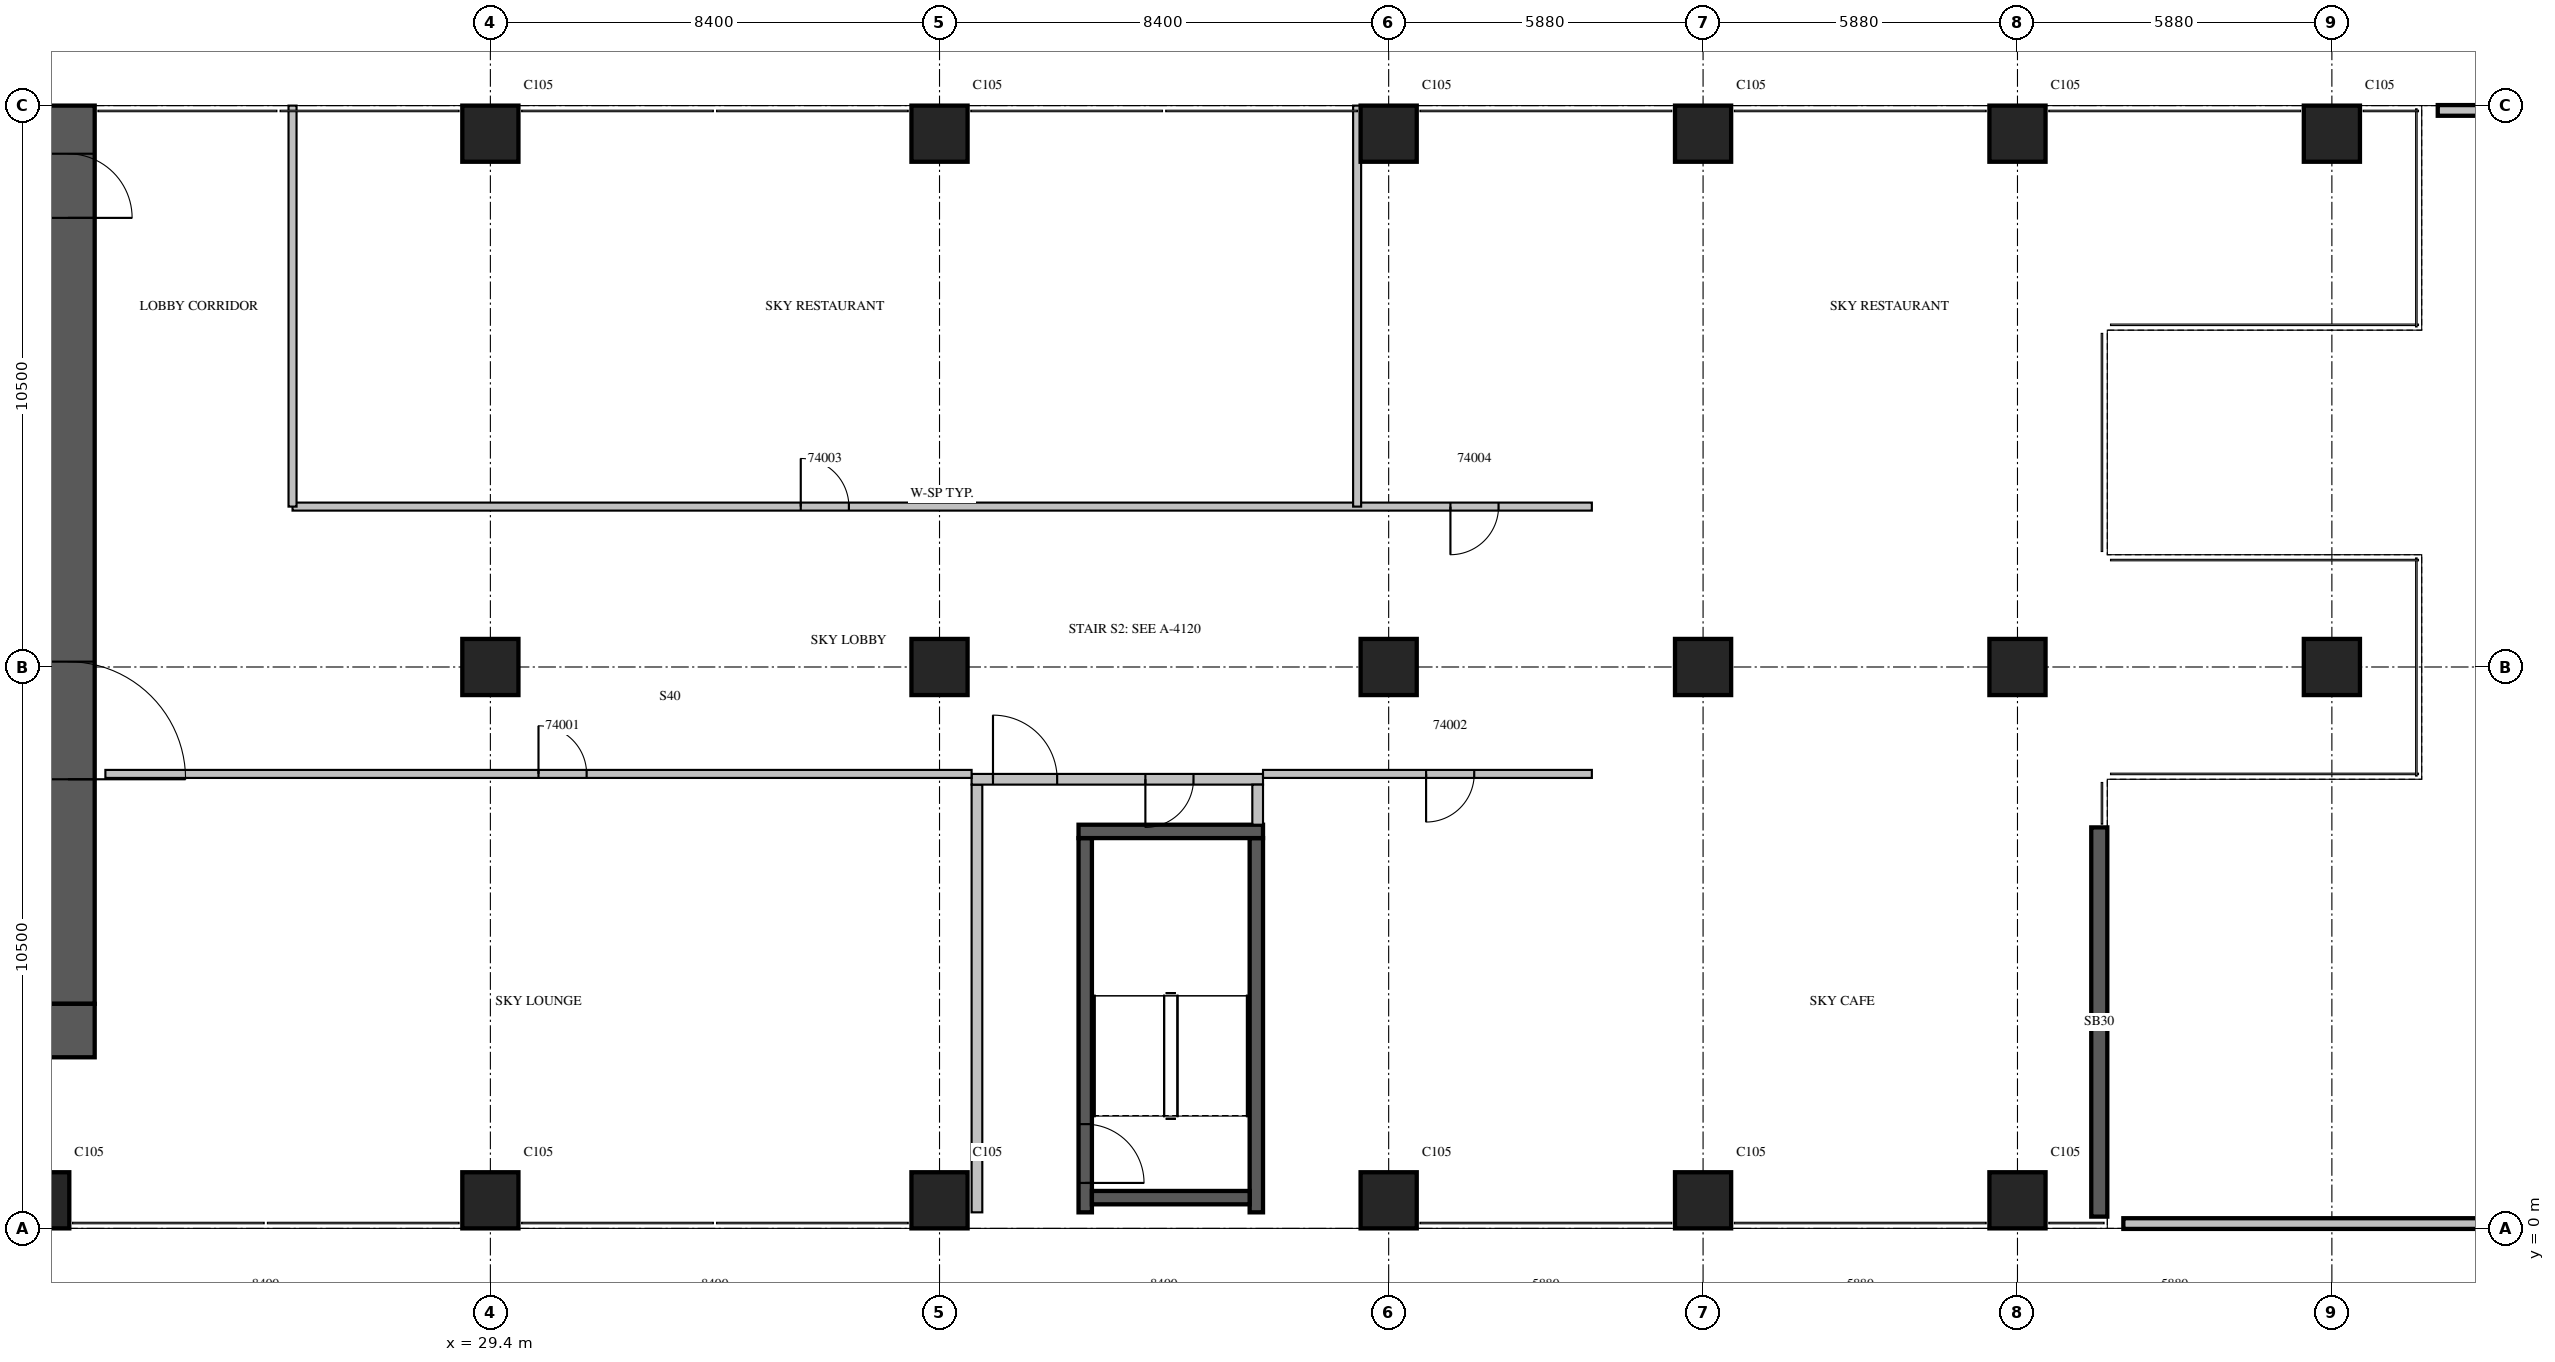
"""IFC4 building model, lengths in metres.
Left out: names, types, materials, properties, quantities, classifications, styles, units other than length and angle.
Written with IfcOpenShell. Run it as: python <this file> out.ifc"""

import sys

from ifc_helpers import new_model, si_unit, direction, frame, frame_2d, origin, origin_2d, place, context, subcontext, project, spatial, rectangle, extrude, source, transform, mapped, element, fill, save


model = new_model("IFC4")
c1 = context("Model", 3, precision=1e-05, world=origin(), true_north=direction((0.0, 1.0)))
c2 = subcontext(c1, "Body", "Model", "MODEL_VIEW")
j1 = project(units=[si_unit("LENGTHUNIT", "METRE"), si_unit("PLANEANGLEUNIT", "RADIAN")], contexts=[c1])
p1 = place(None, origin())
s1 = spatial("IfcSite", under=j1, at=p1, CompositionType="ELEMENT")
p2 = place(p1, origin())
s2 = spatial("IfcBuilding", under=s1, at=p2, CompositionType="ELEMENT")
p3 = place(p2, frame((0.0, 0.0, 170.3)))
s3 = spatial("IfcBuildingStorey", under=s2, at=p3, CompositionType="ELEMENT", Elevation=170.3)
m1 = source(origin(), c2, "Body", "SweptSolid", [
    extrude(rectangle(XDim=1.05, YDim=1.05, at=origin_2d()), origin(), (0.0, 0.0, 1.0), 7.5),
])
for number, where, z_axis, x_axis in (
    (1, (21.0, 0.525, 0.0), (0.0, 0.0, 1.0), (1.0, 0.0, 0.0)),
    (2, (29.4, 0.525, 0.0), (0.0, 0.0, 1.0), (1.0, 0.0, 0.0)),
    (3, (37.8, 0.525, 0.0), (0.0, 0.0, 1.0), (1.0, 0.0, 0.0)),
    (4, (46.2, 0.525, 0.0), (0.0, 0.0, 1.0), (1.0, 0.0, 0.0)),
    (5, (52.08, 0.525, 0.0), (0.0, 0.0, 1.0), (1.0, 0.0, 0.0)),
    (6, (57.96, 0.525, 0.0), (0.0, 0.0, 1.0), (1.0, 0.0, 0.0)),
    (7, (29.4, 10.5, 0.0), (0.0, 0.0, 1.0), (1.0, 0.0, 0.0)),
    (8, (37.8, 10.5, 0.0), (0.0, 0.0, 1.0), (1.0, 0.0, 0.0)),
    (9, (46.2, 10.5, 0.0), (0.0, 0.0, 1.0), (1.0, 0.0, 0.0)),
    (10, (52.08, 10.5, 0.0), (0.0, 0.0, 1.0), (1.0, 0.0, 0.0)),
    (11, (57.96, 10.5, 0.0), (0.0, 0.0, 1.0), (1.0, 0.0, 0.0)),
    (12, (63.84, 10.5, 0.0), (0.0, 0.0, 1.0), (1.0, 0.0, 0.0)),
    (13, (29.4, 20.475, 0.0), (0.0, 0.0, 1.0), (1.0, 0.0, 0.0)),
    (14, (37.8, 20.475, 0.0), (0.0, 0.0, 1.0), (1.0, 0.0, 0.0)),
    (15, (46.2, 20.475, 0.0), (0.0, 0.0, 1.0), (1.0, 0.0, 0.0)),
    (16, (52.08, 20.475, 0.0), (0.0, 0.0, 1.0), (1.0, 0.0, 0.0)),
    (17, (57.96, 20.475, 0.0), (0.0, 0.0, 1.0), (1.0, 0.0, 0.0)),
    (18, (63.84, 20.475, 0.0), (0.0, 0.0, 1.0), (1.0, 0.0, 0.0)),
):
    element("IfcColumn", number, at=place(p3, frame(where, z_axis=z_axis, x_axis=x_axis)), inside=s3, PredefinedType="COLUMN", context=c2, shape_type="MappedRepresentation", body=[
        mapped(m1, transform((0.0, 0.0, 0.0), scale=1.0)),
    ])
p4 = place(p3, frame((21.5, 4.2, 0.0), z_axis=(0.0, 0.0, 1.0), x_axis=(0.0, 1.0, 0.0)))
e19 = element("IfcWall", 19, at=p4, inside=s3, PredefinedType="SHEAR", context=c2, shape_type="SweptSolid", body=[
    extrude(rectangle(XDim=16.8, YDim=1.0, at=frame_2d((8.4, 0.0))), origin(), (0.0, 0.0, 1.0), 7.5),
])
m2 = source(origin(), c2, "Body", "SweptSolid", [
    extrude(rectangle(XDim=2.2, YDim=2.1, at=frame_2d((1.1, 1.05))), frame((0.0, 0.51, 0.0), z_axis=(0.0, -1.0, 0.0), x_axis=(1.0, 0.0, 0.0)), (0.0, 0.0, 1.0), 1.02),
])
p5 = place(p4, frame((4.2, 0.0, 0.0)))
e20 = element("IfcOpeningElement", 20, at=p5, cuts=e19, PredefinedType="OPENING", context=c2, shape_type="MappedRepresentation", body=[
    mapped(m2, transform((0.0, 0.0, 0.0), scale=1.0)),
])
m3 = source(origin(), c2, "Body", "SweptSolid", [
    extrude(rectangle(XDim=1.2, YDim=2.1, at=frame_2d((0.6, 1.05))), frame((0.0, 0.51, 0.0), z_axis=(0.0, -1.0, 0.0), x_axis=(1.0, 0.0, 0.0)), (0.0, 0.0, 1.0), 1.02),
])
p6 = place(p4, frame((14.7, 0.0, 0.0)))
e21 = element("IfcOpeningElement", 21, at=p6, cuts=e19, PredefinedType="OPENING", context=c2, shape_type="MappedRepresentation", body=[
    mapped(m3, transform((0.0, 0.0, 0.0), scale=1.0)),
])
m4 = source(origin(), c2, "Body", "SweptSolid", [
    extrude(rectangle(XDim=17.8, YDim=1.0, at=frame_2d((8.9, 0.0))), origin(), (0.0, 0.0, 1.0), 7.5),
])
p7 = place(p3, frame((4.2, 3.7, 0.0), z_axis=(0.0, 0.0, 1.0), x_axis=(1.0, 0.0, 0.0)))
e22 = element("IfcWall", 22, at=p7, inside=s3, PredefinedType="SHEAR", context=c2, shape_type="MappedRepresentation", body=[
    mapped(m4, transform((0.0, 0.0, 0.0), scale=1.0)),
])
p8 = place(p3, frame((59.49, 0.22, 0.0), z_axis=(0.0, 0.0, 1.0), x_axis=(0.0, 1.0, 0.0)))
e23 = element("IfcWall", 23, at=p8, inside=s3, PredefinedType="SOLIDWALL", context=c2, shape_type="SweptSolid", body=[
    extrude(rectangle(XDim=7.28, YDim=0.3, at=frame_2d((3.64, 0.0))), origin(), (0.0, 0.0, 1.0), 7.1),
])
m5 = source(origin(), c2, "Body", "SweptSolid", [
    extrude(rectangle(XDim=1.29, YDim=0.2, at=frame_2d((0.645, 0.0))), origin(), (0.0, 0.0, 1.0), 1.1),
])
p9 = place(p3, frame((65.82, 20.91, 0.0), z_axis=(0.0, 0.0, 1.0), x_axis=(1.0, 0.0, 0.0)))
e24 = element("IfcWall", 24, at=p9, inside=s3, PredefinedType="PARAPET", context=c2, shape_type="MappedRepresentation", body=[
    mapped(m5, transform((0.0, 0.0, 0.0), scale=1.0)),
])
p10 = place(p3, frame((67.11, 0.09, 0.0), z_axis=(0.0, 0.0, 1.0), x_axis=(-1.0, 0.0, 0.0)))
e25 = element("IfcWall", 25, at=p10, inside=s3, PredefinedType="PARAPET", context=c2, shape_type="SweptSolid", body=[
    extrude(rectangle(XDim=7.17, YDim=0.2, at=frame_2d((3.585, 0.0))), origin(), (0.0, 0.0, 1.0), 1.1),
])
p11 = place(p3, frame((40.525, 0.3, 0.0), z_axis=(0.0, 0.0, 1.0), x_axis=(0.0, 1.0, 0.0)))
e26 = element("IfcWall", 26, at=p11, inside=s3, PredefinedType="SOLIDWALL", context=c2, shape_type="SweptSolid", body=[
    extrude(rectangle(XDim=7.0, YDim=0.25, at=frame_2d((3.5, 0.0))), origin(), (0.0, 0.0, 1.0), 7.1),
])
m6 = source(origin(), c2, "Body", "SweptSolid", [
    extrude(rectangle(XDim=1.1, YDim=2.1, at=frame_2d((0.55, 1.05))), frame((0.0, 0.135, 0.0), z_axis=(0.0, -1.0, 0.0), x_axis=(1.0, 0.0, 0.0)), (0.0, 0.0, 1.0), 0.27),
])
p12 = place(p11, frame((0.55, 0.0, 0.0)))
e27 = element("IfcOpeningElement", 27, at=p12, cuts=e26, PredefinedType="OPENING", context=c2, shape_type="MappedRepresentation", body=[
    mapped(m6, transform((0.0, 0.0, 0.0), scale=1.0)),
])
m7 = source(origin(), c2, "Body", "SweptSolid", [
    extrude(rectangle(XDim=7.0, YDim=0.25, at=frame_2d((3.5, 0.0))), origin(), (0.0, 0.0, 1.0), 7.1),
])
p13 = place(p3, frame((43.725, 0.3, 0.0), z_axis=(0.0, 0.0, 1.0), x_axis=(0.0, 1.0, 0.0)))
e28 = element("IfcWall", 28, at=p13, inside=s3, PredefinedType="SOLIDWALL", context=c2, shape_type="MappedRepresentation", body=[
    mapped(m7, transform((0.0, 0.0, 0.0), scale=1.0)),
])
p14 = place(p3, frame((40.4, 7.425, 0.0), z_axis=(0.0, 0.0, 1.0), x_axis=(1.0, 0.0, 0.0)))
e29 = element("IfcWall", 29, at=p14, inside=s3, PredefinedType="SOLIDWALL", context=c2, shape_type="SweptSolid", body=[
    extrude(rectangle(XDim=3.45, YDim=0.25, at=frame_2d((1.725, 0.0))), origin(), (0.0, 0.0, 1.0), 7.1),
])
p15 = place(p3, frame((40.65, 0.575, 0.0), z_axis=(0.0, 0.0, 1.0), x_axis=(1.0, 0.0, 0.0)))
e30 = element("IfcWall", 30, at=p15, inside=s3, PredefinedType="SOLIDWALL", context=c2, shape_type="SweptSolid", body=[
    extrude(rectangle(XDim=2.95, YDim=0.25, at=frame_2d((1.475, 0.0))), origin(), (0.0, 0.0, 1.0), 7.1),
])
p16 = place(p3, frame((38.5, 0.3, 0.0), z_axis=(0.0, 0.0, 1.0), x_axis=(0.0, 1.0, 0.0)))
e31 = element("IfcWall", 31, at=p16, inside=s3, PredefinedType="PARTITIONING", context=c2, shape_type="SweptSolid", body=[
    extrude(rectangle(XDim=8.0, YDim=0.2, at=frame_2d((4.0, 0.0))), origin(), (0.0, 0.0, 1.0), 7.1),
])
p17 = place(p3, frame((38.4, 8.4, 0.0), z_axis=(0.0, 0.0, 1.0), x_axis=(1.0, 0.0, 0.0)))
e32 = element("IfcWall", 32, at=p17, inside=s3, PredefinedType="PARTITIONING", context=c2, shape_type="SweptSolid", body=[
    extrude(rectangle(XDim=5.45, YDim=0.2, at=frame_2d((2.725, 0.0))), origin(), (0.0, 0.0, 1.0), 7.1),
])
m8 = source(origin(), c2, "Body", "SweptSolid", [
    extrude(rectangle(XDim=1.2, YDim=2.1, at=frame_2d((0.6, 1.05))), frame((0.0, 0.11, 0.0), z_axis=(0.0, -1.0, 0.0), x_axis=(1.0, 0.0, 0.0)), (0.0, 0.0, 1.0), 0.22),
])
p18 = place(p17, frame((0.4, 0.0, 0.0)))
e33 = element("IfcOpeningElement", 33, at=p18, cuts=e32, PredefinedType="OPENING", context=c2, shape_type="MappedRepresentation", body=[
    mapped(m8, transform((0.0, 0.0, 0.0), scale=1.0)),
])
m9 = source(origin(), c2, "Body", "SweptSolid", [
    extrude(rectangle(XDim=0.9, YDim=2.1, at=frame_2d((0.45, 1.05))), frame((0.0, 0.11, 0.0), z_axis=(0.0, -1.0, 0.0), x_axis=(1.0, 0.0, 0.0)), (0.0, 0.0, 1.0), 0.22),
])
p19 = place(p17, frame((3.25, 0.0, 0.0)))
e34 = element("IfcOpeningElement", 34, at=p19, cuts=e32, PredefinedType="OPENING", context=c2, shape_type="MappedRepresentation", body=[
    mapped(m9, transform((0.0, 0.0, 0.0), scale=1.0)),
])
p20 = place(p3, frame((43.75, 7.55, 0.0), z_axis=(0.0, 0.0, 1.0), x_axis=(0.0, 1.0, 0.0)))
e35 = element("IfcWall", 35, at=p20, inside=s3, PredefinedType="PARTITIONING", context=c2, shape_type="SweptSolid", body=[
    extrude(rectangle(XDim=0.75, YDim=0.2, at=frame_2d((0.375, 0.0))), origin(), (0.0, 0.0, 1.0), 7.1),
])
p21 = place(p3, frame((22.2, 8.5, 0.0), z_axis=(0.0, 0.0, 1.0), x_axis=(1.0, 0.0, 0.0)))
e36 = element("IfcWall", 36, at=p21, inside=s3, PredefinedType="PARTITIONING", context=c2, shape_type="SweptSolid", body=[
    extrude(rectangle(XDim=16.2, YDim=0.15, at=frame_2d((8.1, 0.0))), origin(), (0.0, 0.0, 1.0), 7.1),
])
m10 = source(origin(), c2, "Body", "SweptSolid", [
    extrude(rectangle(XDim=0.9, YDim=2.1, at=frame_2d((0.45, 1.05))), frame((0.0, 0.085, 0.0), z_axis=(0.0, -1.0, 0.0), x_axis=(1.0, 0.0, 0.0)), (0.0, 0.0, 1.0), 0.17),
])
p22 = place(p21, frame((8.1, 0.0, 0.0)))
e37 = element("IfcOpeningElement", 37, at=p22, cuts=e36, PredefinedType="OPENING", context=c2, shape_type="MappedRepresentation", body=[
    mapped(m10, transform((0.0, 0.0, 0.0), scale=1.0)),
])
p23 = place(p3, frame((43.85, 8.5, 0.0), z_axis=(0.0, 0.0, 1.0), x_axis=(1.0, 0.0, 0.0)))
e38 = element("IfcWall", 38, at=p23, inside=s3, PredefinedType="PARTITIONING", context=c2, shape_type="SweptSolid", body=[
    extrude(rectangle(XDim=6.15, YDim=0.15, at=frame_2d((3.075, 0.0))), origin(), (0.0, 0.0, 1.0), 7.1),
])
p24 = place(p23, frame((3.05, 0.0, 0.0)))
e39 = element("IfcOpeningElement", 39, at=p24, cuts=e38, PredefinedType="OPENING", context=c2, shape_type="MappedRepresentation", body=[
    mapped(m10, transform((0.0, 0.0, 0.0), scale=1.0)),
])
p25 = place(p3, frame((25.7, 13.5, 0.0), z_axis=(0.0, 0.0, 1.0), x_axis=(1.0, 0.0, 0.0)))
e40 = element("IfcWall", 40, at=p25, inside=s3, PredefinedType="PARTITIONING", context=c2, shape_type="SweptSolid", body=[
    extrude(rectangle(XDim=24.3, YDim=0.15, at=frame_2d((12.15, 0.0))), origin(), (0.0, 0.0, 1.0), 7.1),
])
p26 = place(p25, frame((9.505, 0.0, 0.0)))
e41 = element("IfcOpeningElement", 41, at=p26, cuts=e40, PredefinedType="OPENING", context=c2, shape_type="MappedRepresentation", body=[
    mapped(m10, transform((0.0, 0.0, 0.0), scale=1.0)),
])
p27 = place(p25, frame((21.655, 0.0, 0.0)))
e42 = element("IfcOpeningElement", 42, at=p27, cuts=e40, PredefinedType="OPENING", context=c2, shape_type="MappedRepresentation", body=[
    mapped(m10, transform((0.0, 0.0, 0.0), scale=1.0)),
])
p28 = place(p3, frame((25.7, 13.5, 0.0), z_axis=(0.0, 0.0, 1.0), x_axis=(0.0, 1.0, 0.0)))
e43 = element("IfcWall", 43, at=p28, inside=s3, PredefinedType="PARTITIONING", context=c2, shape_type="SweptSolid", body=[
    extrude(rectangle(XDim=7.5, YDim=0.15, at=frame_2d((3.75, 0.0))), origin(), (0.0, 0.0, 1.0), 7.1),
])
m11 = source(origin(), c2, "Body", "SweptSolid", [
    extrude(rectangle(XDim=7.5, YDim=0.15, at=frame_2d((3.75, 0.0))), origin(), (0.0, 0.0, 1.0), 7.1),
])
p29 = place(p3, frame((45.61, 13.5, 0.0), z_axis=(0.0, 0.0, 1.0), x_axis=(0.0, 1.0, 0.0)))
e44 = element("IfcWall", 44, at=p29, inside=s3, PredefinedType="PARTITIONING", context=c2, shape_type="MappedRepresentation", body=[
    mapped(m11, transform((0.0, 0.0, 0.0), scale=1.0)),
])
m12 = source(origin(), c2, "Body", "SweptSolid", [
    extrude(rectangle(XDim=1.1, YDim=2.1, at=frame_2d((0.55, 1.05))), frame((0.0, 0.025, 0.0), z_axis=(0.0, -1.0, 0.0), x_axis=(1.0, 0.0, 0.0)), (0.0, 0.0, 1.0), 0.05),
])
p30 = place(p12, origin())
e45 = element("IfcDoor", 45, at=p30, inside=s3, OperationType="SINGLE_SWING_RIGHT", PredefinedType="DOOR", context=c2, shape_type="MappedRepresentation", body=[
    mapped(m12, transform((0.0, 0.0, 0.0), scale=1.0)),
])
fill(e27, e45)
m13 = source(origin(), c2, "Body", "SweptSolid", [
    extrude(rectangle(XDim=1.2, YDim=2.1, at=frame_2d((0.6, 1.05))), frame((0.0, 0.025, 0.0), z_axis=(0.0, -1.0, 0.0), x_axis=(1.0, 0.0, 0.0)), (0.0, 0.0, 1.0), 0.05),
])
p31 = place(p18, origin())
e46 = element("IfcDoor", 46, at=p31, inside=s3, OperationType="SINGLE_SWING_LEFT", PredefinedType="DOOR", context=c2, shape_type="MappedRepresentation", body=[
    mapped(m13, transform((0.0, 0.0, 0.0), scale=1.0)),
])
fill(e33, e46)
m14 = source(origin(), c2, "Body", "SweptSolid", [
    extrude(rectangle(XDim=0.9, YDim=2.1, at=frame_2d((0.45, 1.05))), frame((0.0, 0.025, 0.0), z_axis=(0.0, -1.0, 0.0), x_axis=(1.0, 0.0, 0.0)), (0.0, 0.0, 1.0), 0.05),
])
p32 = place(p19, origin())
e47 = element("IfcDoor", 47, at=p32, inside=s3, OperationType="SINGLE_SWING_RIGHT", PredefinedType="DOOR", context=c2, shape_type="MappedRepresentation", body=[
    mapped(m14, transform((0.0, 0.0, 0.0), scale=1.0)),
])
fill(e34, e47)
m15 = source(origin(), c2, "Body", "SweptSolid", [
    extrude(rectangle(XDim=2.2, YDim=2.1, at=frame_2d((1.1, 1.05))), frame((0.0, 0.025, 0.0), z_axis=(0.0, -1.0, 0.0), x_axis=(1.0, 0.0, 0.0)), (0.0, 0.0, 1.0), 0.05),
])
p33 = place(p5, origin())
e48 = element("IfcDoor", 48, at=p33, inside=s3, OperationType="DOUBLE_DOOR_SINGLE_SWING", PredefinedType="DOOR", context=c2, shape_type="MappedRepresentation", body=[
    mapped(m15, transform((0.0, 0.0, 0.0), scale=1.0)),
])
fill(e20, e48)
p34 = place(p6, origin())
e49 = element("IfcDoor", 49, at=p34, inside=s3, OperationType="SINGLE_SWING_RIGHT", PredefinedType="DOOR", context=c2, shape_type="MappedRepresentation", body=[
    mapped(m13, transform((0.0, 0.0, 0.0), scale=1.0)),
])
fill(e21, e49)
p35 = place(p22, origin())
e50 = element("IfcDoor", 50, at=p35, inside=s3, OperationType="SINGLE_SWING_LEFT", PredefinedType="DOOR", context=c2, shape_type="MappedRepresentation", body=[
    mapped(m14, transform((0.0, 0.0, 0.0), scale=1.0)),
])
fill(e37, e50)
p36 = place(p24, origin())
e51 = element("IfcDoor", 51, at=p36, inside=s3, OperationType="SINGLE_SWING_RIGHT", PredefinedType="DOOR", context=c2, shape_type="MappedRepresentation", body=[
    mapped(m14, transform((0.0, 0.0, 0.0), scale=1.0)),
])
fill(e39, e51)
p37 = place(p26, origin())
e52 = element("IfcDoor", 52, at=p37, inside=s3, OperationType="SINGLE_SWING_LEFT", PredefinedType="DOOR", context=c2, shape_type="MappedRepresentation", body=[
    mapped(m14, transform((0.0, 0.0, 0.0), scale=1.0)),
])
fill(e41, e52)
p38 = place(p27, origin())
e53 = element("IfcDoor", 53, at=p38, inside=s3, OperationType="SINGLE_SWING_RIGHT", PredefinedType="DOOR", context=c2, shape_type="MappedRepresentation", body=[
    mapped(m14, transform((0.0, 0.0, 0.0), scale=1.0)),
])
fill(e42, e53)
save(model, sys.argv[1])
